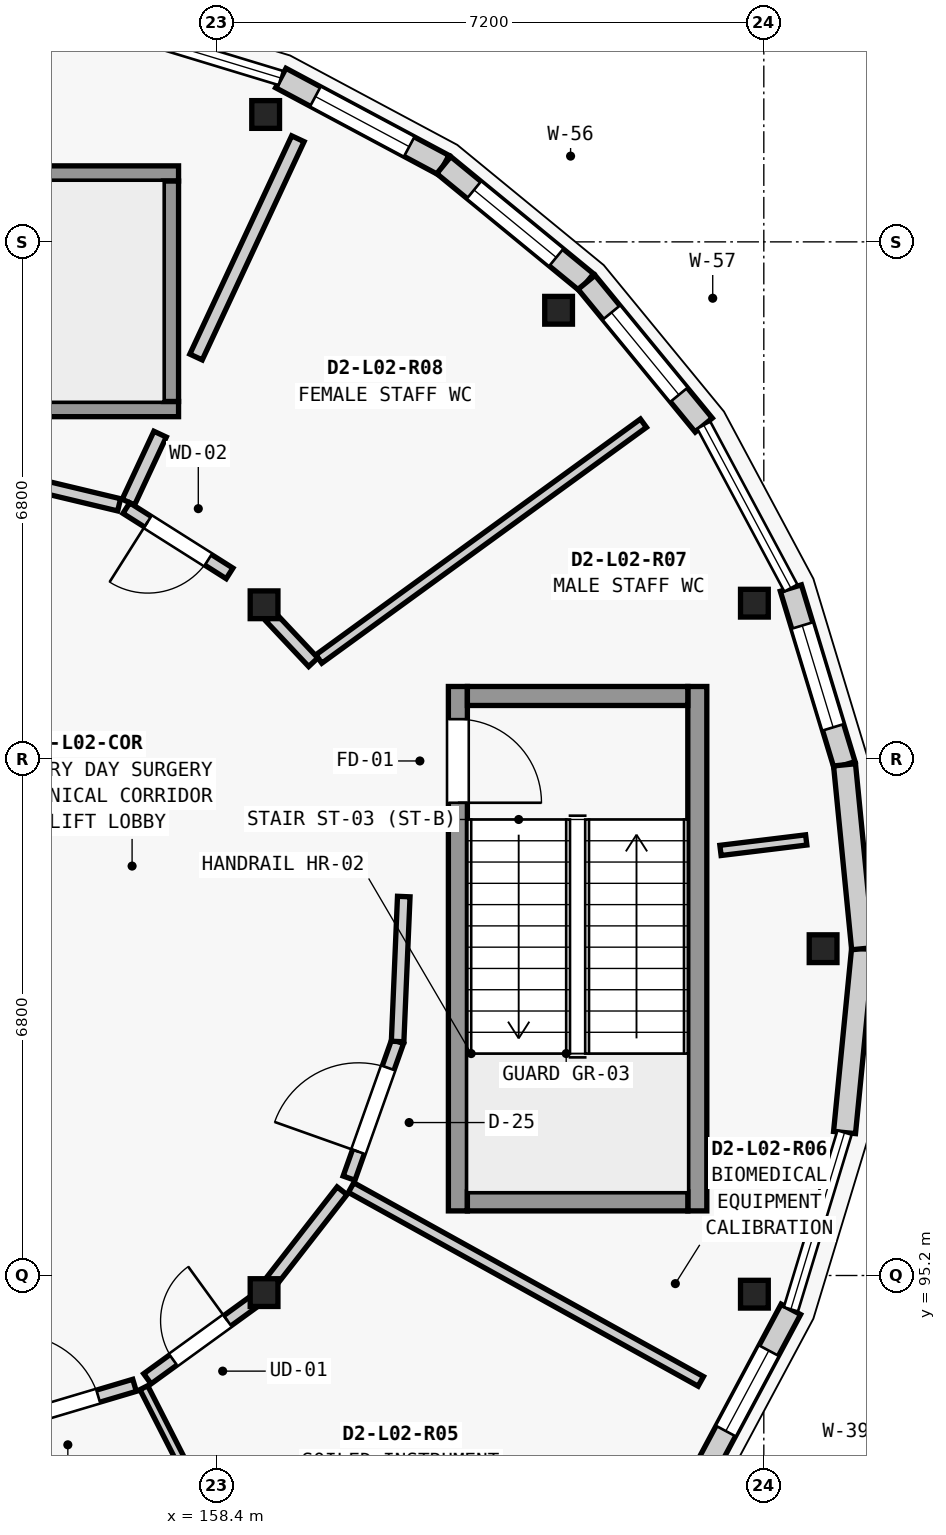
"""IFC4 building model, lengths in metres.
Left out: names, types, materials, properties, quantities, classifications, styles, units other than length and angle.
Written with IfcOpenShell. Run it as: python <this file> out.ifc"""

import sys

from ifc_helpers import new_model, si_unit, direction, frame, frame_2d, origin, origin_2d, place, context, subcontext, project, spatial, rectangle, extrude, element, fill, save


model = new_model("IFC4")
c1 = context("Model", 3, precision=1e-05, world=origin(), true_north=direction((0.0, 1.0)))
c2 = subcontext(c1, "Body", "Model", "MODEL_VIEW")
j1 = project(units=[si_unit("LENGTHUNIT", "METRE"), si_unit("PLANEANGLEUNIT", "RADIAN")], contexts=[c1])
p1 = place(None, origin())
s1 = spatial("IfcSite", under=j1, at=p1, CompositionType="ELEMENT")
p2 = place(p1, origin())
s2 = spatial("IfcBuilding", under=s1, at=p2, CompositionType="ELEMENT")
p3 = place(p2, frame((0.0, 0.0, 8.75)))
s3 = spatial("IfcBuildingStorey", under=s2, at=p3, CompositionType="ELEMENT", Elevation=8.75)
for number, where, z_axis, x_axis in (
    (1, (166.38, 99.5, 0.0), (0.0, 0.0, 1.0), (1.0, 0.0, 0.0)),
    (2, (165.476, 104.046, 0.0), (0.0, 0.0, 1.0), (1.0, 0.0, 0.0)),
    (3, (162.9, 107.9, 0.0), (0.0, 0.0, 1.0), (1.0, 0.0, 0.0)),
    (4, (159.046, 110.476, 0.0), (0.0, 0.0, 1.0), (1.0, 0.0, 0.0)),
    (5, (165.476, 94.954, 0.0), (0.0, 0.0, 1.0), (1.0, 0.0, 0.0)),
    (6, (159.025, 104.025, 0.0), (0.0, 0.0, 1.0), (1.0, 0.0, 0.0)),
    (7, (159.025, 94.975, 0.0), (0.0, 0.0, 1.0), (1.0, 0.0, 0.0)),
):
    element("IfcColumn", number, at=place(p3, frame(where, z_axis=z_axis, x_axis=x_axis)), inside=s3, PredefinedType="COLUMN", context=c2, shape_type="SweptSolid", body=[
        extrude(rectangle(XDim=0.365, YDim=0.365, at=origin_2d()), origin(), (0.0, 0.0, 1.0), 4.2),
    ])
p4 = place(p3, frame((166.9, 99.5, 0.0), z_axis=(0.0, 0.0, 1.0), x_axis=(-0.097832820839, -0.995202863323, 0.0)))
e8 = element("IfcWall", 8, at=p4, inside=s3, PredefinedType="ELEMENTEDWALL", context=c2, shape_type="SweptSolid", body=[
    extrude(rectangle(XDim=2.431, YDim=0.29, at=frame_2d((1.215, 0.0))), origin(), (0.0, 0.0, 1.0), 3.329),
])
p5 = place(p3, frame((165.956, 94.755, 0.0), z_axis=(0.0, 0.0, 1.0), x_axis=(-0.471432490996, -0.881902152415, 0.0)))
e9 = element("IfcWall", 9, at=p5, inside=s3, PredefinedType="ELEMENTEDWALL", context=c2, shape_type="SweptSolid", body=[
    extrude(rectangle(XDim=2.431, YDim=0.29, at=frame_2d((1.215, 0.0))), origin(), (0.0, 0.0, 1.0), 3.329),
])
p6 = place(p5, frame((0.616, 0.0, 0.85)))
e10 = element("IfcOpeningElement", 10, at=p6, cuts=e9, PredefinedType="OPENING", context=c2, shape_type="SweptSolid", body=[
    extrude(rectangle(XDim=1.2, YDim=2.25, at=frame_2d((0.6, 1.125))), frame((0.0, 0.155, 0.0), z_axis=(0.0, -1.0, 0.0), x_axis=(1.0, 0.0, 0.0)), (0.0, 0.0, 1.0), 0.31),
])
p7 = place(p3, frame((159.245, 110.956, 0.0), z_axis=(0.0, 0.0, 1.0), x_axis=(0.881902152415, -0.471432490996, 0.0)))
e11 = element("IfcWall", 11, at=p7, inside=s3, PredefinedType="ELEMENTEDWALL", context=c2, shape_type="SweptSolid", body=[
    extrude(rectangle(XDim=2.431, YDim=0.29, at=frame_2d((1.215, 0.0))), origin(), (0.0, 0.0, 1.0), 3.329),
])
p8 = place(p7, frame((0.516, 0.0, 0.85)))
e12 = element("IfcOpeningElement", 12, at=p8, cuts=e11, PredefinedType="OPENING", context=c2, shape_type="SweptSolid", body=[
    extrude(rectangle(XDim=1.4, YDim=1.25, at=frame_2d((0.7, 0.625))), frame((0.0, 0.155, 0.0), z_axis=(0.0, -1.0, 0.0), x_axis=(1.0, 0.0, 0.0)), (0.0, 0.0, 1.0), 0.31),
])
p9 = place(p3, frame((161.389, 109.81, 0.0), z_axis=(0.0, 0.0, 1.0), x_axis=(0.773048113134, -0.634347392822, 0.0)))
e13 = element("IfcWall", 13, at=p9, inside=s3, PredefinedType="ELEMENTEDWALL", context=c2, shape_type="SweptSolid", body=[
    extrude(rectangle(XDim=2.431, YDim=0.29, at=frame_2d((1.215, 0.0))), origin(), (0.0, 0.0, 1.0), 3.329),
])
p10 = place(p9, frame((0.515, 0.0, 0.85)))
e14 = element("IfcOpeningElement", 14, at=p10, cuts=e13, PredefinedType="OPENING", context=c2, shape_type="SweptSolid", body=[
    extrude(rectangle(XDim=1.4, YDim=1.6, at=frame_2d((0.7, 0.8))), frame((0.0, 0.155, 0.0), z_axis=(0.0, -1.0, 0.0), x_axis=(1.0, 0.0, 0.0)), (0.0, 0.0, 1.0), 0.31),
])
p11 = place(p3, frame((163.268, 108.268, 0.0), z_axis=(0.0, 0.0, 1.0), x_axis=(0.634347392822, -0.773048113134, 0.0)))
e15 = element("IfcWall", 15, at=p11, inside=s3, PredefinedType="ELEMENTEDWALL", context=c2, shape_type="SweptSolid", body=[
    extrude(rectangle(XDim=2.431, YDim=0.29, at=frame_2d((1.215, 0.0))), origin(), (0.0, 0.0, 1.0), 3.329),
])
p12 = place(p11, frame((0.515, 0.0, 0.85)))
e16 = element("IfcOpeningElement", 16, at=p12, cuts=e15, PredefinedType="OPENING", context=c2, shape_type="SweptSolid", body=[
    extrude(rectangle(XDim=1.4, YDim=1.9, at=frame_2d((0.7, 0.95))), frame((0.0, 0.155, 0.0), z_axis=(0.0, -1.0, 0.0), x_axis=(1.0, 0.0, 0.0)), (0.0, 0.0, 1.0), 0.31),
])
p13 = place(p3, frame((165.956, 104.245, 0.0), z_axis=(0.0, 0.0, 1.0), x_axis=(0.290442193951, -0.956892539407, 0.0)))
e17 = element("IfcWall", 17, at=p13, inside=s3, PredefinedType="ELEMENTEDWALL", context=c2, shape_type="SweptSolid", body=[
    extrude(rectangle(XDim=2.431, YDim=0.29, at=frame_2d((1.215, 0.0))), origin(), (0.0, 0.0, 1.0), 3.329),
])
p14 = place(p13, frame((0.515, 0.0, 0.85)))
e18 = element("IfcOpeningElement", 18, at=p14, cuts=e17, PredefinedType="OPENING", context=c2, shape_type="SweptSolid", body=[
    extrude(rectangle(XDim=1.4, YDim=2.2, at=frame_2d((0.7, 1.1))), frame((0.0, 0.155, 0.0), z_axis=(0.0, -1.0, 0.0), x_axis=(1.0, 0.0, 0.0)), (0.0, 0.0, 1.0), 0.31),
])
p15 = place(p3, frame((166.662, 101.919, 0.0), z_axis=(0.0, 0.0, 1.0), x_axis=(0.097832820839, -0.995202863323, 0.0)))
e19 = element("IfcWall", 19, at=p15, inside=s3, PredefinedType="ELEMENTEDWALL", context=c2, shape_type="SweptSolid", body=[
    extrude(rectangle(XDim=2.431, YDim=0.29, at=frame_2d((1.215, 0.0))), origin(), (0.0, 0.0, 1.0), 3.329),
])
p16 = place(p3, frame((161.575, 102.95, 0.0), z_axis=(0.0, 0.0, 1.0), x_axis=(0.0, -1.0, 0.0)))
e20 = element("IfcWall", 20, at=p16, inside=s3, PredefinedType="SHEAR", context=c2, shape_type="SweptSolid", body=[
    extrude(rectangle(XDim=6.9, YDim=0.25, at=frame_2d((3.45, 0.0))), origin(), (0.0, 0.0, 1.0), 3.975),
])
p17 = place(p16, frame((0.43, 0.0, 0.0)))
e21 = element("IfcOpeningElement", 21, at=p17, cuts=e20, PredefinedType="OPENING", context=c2, shape_type="SweptSolid", body=[
    extrude(rectangle(XDim=1.1, YDim=2.15, at=frame_2d((0.55, 1.075))), frame((0.0, 0.135, 0.0), z_axis=(0.0, -1.0, 0.0), x_axis=(1.0, 0.0, 0.0)), (0.0, 0.0, 1.0), 0.27),
])
p18 = place(p3, frame((164.725, 102.95, 0.0), z_axis=(0.0, 0.0, 1.0), x_axis=(0.0, -1.0, 0.0)))
e22 = element("IfcWall", 22, at=p18, inside=s3, PredefinedType="SHEAR", context=c2, shape_type="SweptSolid", body=[
    extrude(rectangle(XDim=6.9, YDim=0.25, at=frame_2d((3.45, 0.0))), origin(), (0.0, 0.0, 1.0), 3.975),
])
for number, where, z_axis, x_axis in (
    (23, (161.7, 102.825, 0.0), (0.0, 0.0, 1.0), (1.0, 0.0, 0.0)),
    (24, (161.7, 96.175, 0.0), (0.0, 0.0, 1.0), (1.0, 0.0, 0.0)),
):
    element("IfcWall", number, at=place(p3, frame(where, z_axis=z_axis, x_axis=x_axis)), inside=s3, PredefinedType="SHEAR", context=c2, shape_type="SweptSolid", body=[
        extrude(rectangle(XDim=2.9, YDim=0.25, at=frame_2d((1.45, 0.0))), origin(), (0.0, 0.0, 1.0), 3.975),
    ])
p19 = place(p3, frame((151.1, 106.6, 0.0), z_axis=(0.0, 0.0, 1.0), x_axis=(1.0, 0.0, 0.0)))
e25 = element("IfcWall", 25, at=p19, inside=s3, PredefinedType="SHEAR", context=c2, shape_type="SweptSolid", body=[
    extrude(rectangle(XDim=6.8, YDim=0.2, at=frame_2d((3.4, 0.0))), origin(), (0.0, 0.0, 1.0), 3.975),
])
p20 = place(p19, frame((0.38, 0.0, 0.0)))
e26 = element("IfcOpeningElement", 26, at=p20, cuts=e25, PredefinedType="OPENING", context=c2, shape_type="SweptSolid", body=[
    extrude(rectangle(XDim=1.05, YDim=2.15, at=frame_2d((0.525, 1.075))), frame((0.0, 0.11, 0.0), z_axis=(0.0, -1.0, 0.0), x_axis=(1.0, 0.0, 0.0)), (0.0, 0.0, 1.0), 0.22),
])
p21 = place(p3, frame((151.1, 109.7, 0.0), z_axis=(0.0, 0.0, 1.0), x_axis=(1.0, 0.0, 0.0)))
e27 = element("IfcWall", 27, at=p21, inside=s3, PredefinedType="SHEAR", context=c2, shape_type="SweptSolid", body=[
    extrude(rectangle(XDim=6.8, YDim=0.2, at=frame_2d((3.4, 0.0))), origin(), (0.0, 0.0, 1.0), 3.975),
])
p22 = place(p3, frame((157.8, 106.7, 0.0), z_axis=(0.0, 0.0, 1.0), x_axis=(0.0, 1.0, 0.0)))
e28 = element("IfcWall", 28, at=p22, inside=s3, PredefinedType="SHEAR", context=c2, shape_type="SweptSolid", body=[
    extrude(rectangle(XDim=2.9, YDim=0.2, at=frame_2d((1.45, 0.0))), origin(), (0.0, 0.0, 1.0), 3.975),
])
p23 = place(p3, frame((157.24, 105.376, 0.0), z_axis=(0.0, 0.0, 1.0), x_axis=(0.422695781641, 0.906271634877, 0.0)))
e29 = element("IfcWall", 29, at=p23, inside=s3, PredefinedType="PARTITIONING", context=c2, shape_type="SweptSolid", body=[
    extrude(rectangle(XDim=0.987, YDim=0.18, at=frame_2d((0.493, 0.0))), origin(), (0.0, 0.0, 1.0), 3.304),
])
p24 = place(p3, frame((158.13, 107.285, 0.0), z_axis=(0.0, 0.0, 1.0), x_axis=(0.422830642255, 0.906208722078, 0.0)))
e30 = element("IfcWall", 30, at=p24, inside=s3, PredefinedType="PARTITIONING", context=c2, shape_type="SweptSolid", body=[
    extrude(rectangle(XDim=3.169, YDim=0.18, at=frame_2d((1.585, 0.0))), origin(), (0.0, 0.0, 1.0), 3.304),
])
p25 = place(p3, frame((157.443, 93.724, 0.0), z_axis=(0.0, 0.0, 1.0), x_axis=(0.454011967175, -0.890995585658, 0.0)))
e31 = element("IfcWall", 31, at=p25, inside=s3, PredefinedType="PARTITIONING", context=c2, shape_type="SweptSolid", body=[
    extrude(rectangle(XDim=5.262, YDim=0.115, at=frame_2d((2.631, 0.0))), origin(), (0.0, 0.0, 1.0), 3.304),
])
p26 = place(p3, frame((160.17, 96.357, 0.0), z_axis=(0.0, 0.0, 1.0), x_axis=(0.874649389138, -0.484756068638, 0.0)))
e32 = element("IfcWall", 32, at=p26, inside=s3, PredefinedType="PARTITIONING", context=c2, shape_type="SweptSolid", body=[
    extrude(rectangle(XDim=5.26, YDim=0.145, at=frame_2d((2.63, 0.0))), origin(), (0.0, 0.0, 1.0), 3.304),
])
p27 = place(p3, frame((165.03, 100.793, 0.0), z_axis=(0.0, 0.0, 1.0), x_axis=(0.992604891092, 0.121389992092, 0.0)))
e33 = element("IfcWall", 33, at=p27, inside=s3, PredefinedType="PLUMBINGWALL", context=c2, shape_type="SweptSolid", body=[
    extrude(rectangle(XDim=1.136, YDim=0.135, at=frame_2d((0.568, 0.0))), origin(), (0.0, 0.0, 1.0), 3.304),
])
p28 = place(p3, frame((159.745, 103.311, 0.0), z_axis=(0.0, 0.0, 1.0), x_axis=(0.809019962828, 0.587781166545, 0.0)))
e34 = element("IfcWall", 34, at=p28, inside=s3, PredefinedType="PLUMBINGWALL", context=c2, shape_type="SweptSolid", body=[
    extrude(rectangle(XDim=5.279, YDim=0.135, at=frame_2d((2.64, 0.0))), origin(), (0.0, 0.0, 1.0), 3.304),
])
p29 = place(p3, frame((157.118, 105.34, 0.0), z_axis=(0.0, 0.0, 1.0), x_axis=(-0.972635355986, 0.232336962804, 0.0)))
e35 = element("IfcWall", 35, at=p29, inside=s3, PredefinedType="PARTITIONING", context=c2, shape_type="SweptSolid", body=[
    extrude(rectangle(XDim=2.38, YDim=0.165, at=frame_2d((1.19, 0.0))), origin(), (0.0, 0.0, 1.0), 3.304),
])
p30 = place(p3, frame((155.28, 93.148, 0.0), z_axis=(0.0, 0.0, 1.0), x_axis=(0.958517732376, 0.285032904628, 0.0)))
e36 = element("IfcWall", 36, at=p30, inside=s3, PredefinedType="PARTITIONING", context=c2, shape_type="SweptSolid", body=[
    extrude(rectangle(XDim=2.129, YDim=0.165, at=frame_2d((1.065, 0.0))), origin(), (0.0, 0.0, 1.0), 3.304),
])
p31 = place(p30, frame((0.5, 0.0, 0.0)))
e37 = element("IfcOpeningElement", 37, at=p31, cuts=e36, PredefinedType="OPENING", context=c2, shape_type="SweptSolid", body=[
    extrude(rectangle(XDim=1.13, YDim=2.14, at=frame_2d((0.565, 1.07))), frame((0.0, 0.093, 0.0), z_axis=(0.0, -1.0, 0.0), x_axis=(1.0, 0.0, 0.0)), (0.0, 0.0, 1.0), 0.185),
])
p32 = place(p3, frame((157.49, 93.841, 0.0), z_axis=(0.0, 0.0, 1.0), x_axis=(0.809526218979, 0.587083725533, 0.0)))
e38 = element("IfcWall", 38, at=p32, inside=s3, PredefinedType="PARTITIONING", context=c2, shape_type="SweptSolid", body=[
    extrude(rectangle(XDim=1.722, YDim=0.165, at=frame_2d((0.861, 0.0))), origin(), (0.0, 0.0, 1.0), 3.304),
])
p33 = place(p32, frame((0.421, 0.0, 0.0)))
e39 = element("IfcOpeningElement", 39, at=p33, cuts=e38, PredefinedType="OPENING", context=c2, shape_type="SweptSolid", body=[
    extrude(rectangle(XDim=0.88, YDim=2.1, at=frame_2d((0.44, 1.05))), frame((0.0, 0.093, 0.0), z_axis=(0.0, -1.0, 0.0), x_axis=(1.0, 0.0, 0.0)), (0.0, 0.0, 1.0), 0.185),
])
p34 = place(p3, frame((159.129, 95.131, 0.0), z_axis=(0.0, 0.0, 1.0), x_axis=(0.61450363649, 0.788913988176, 0.0)))
e40 = element("IfcWall", 40, at=p34, inside=s3, PredefinedType="PARTITIONING", context=c2, shape_type="SweptSolid", body=[
    extrude(rectangle(XDim=1.5, YDim=0.165, at=frame_2d((0.75, 0.0))), origin(), (0.0, 0.0, 1.0), 3.304),
])
p35 = place(p3, frame((160.143, 96.481, 0.0), z_axis=(0.0, 0.0, 1.0), x_axis=(0.334820358273, 0.942281978861, 0.0)))
e41 = element("IfcWall", 41, at=p35, inside=s3, PredefinedType="PARTITIONING", context=c2, shape_type="SweptSolid", body=[
    extrude(rectangle(XDim=1.908, YDim=0.165, at=frame_2d((0.954, 0.0))), origin(), (0.0, 0.0, 1.0), 3.304),
])
p36 = place(p35, frame((0.369, 0.0, 0.0)))
e42 = element("IfcOpeningElement", 42, at=p36, cuts=e41, PredefinedType="OPENING", context=c2, shape_type="SweptSolid", body=[
    extrude(rectangle(XDim=1.17, YDim=2.24, at=frame_2d((0.585, 1.12))), frame((0.0, 0.093, 0.0), z_axis=(0.0, -1.0, 0.0), x_axis=(1.0, 0.0, 0.0)), (0.0, 0.0, 1.0), 0.185),
])
p37 = place(p3, frame((160.782, 98.279, 0.0), z_axis=(0.0, 0.0, 1.0), x_axis=(0.042465818656, 0.999097920249, 0.0)))
e43 = element("IfcWall", 43, at=p37, inside=s3, PredefinedType="PARTITIONING", context=c2, shape_type="SweptSolid", body=[
    extrude(rectangle(XDim=1.909, YDim=0.165, at=frame_2d((0.954, 0.0))), origin(), (0.0, 0.0, 1.0), 3.304),
])
p38 = place(p3, frame((159.672, 103.269, 0.0), z_axis=(0.0, 0.0, 1.0), x_axis=(-0.685308492068, 0.728252889249, 0.0)))
e44 = element("IfcWall", 44, at=p38, inside=s3, PredefinedType="PARTITIONING", context=c2, shape_type="SweptSolid", body=[
    extrude(rectangle(XDim=0.813, YDim=0.165, at=frame_2d((0.406, 0.0))), origin(), (0.0, 0.0, 1.0), 3.304),
])
p39 = place(p3, frame((158.571, 104.438, 0.0), z_axis=(0.0, 0.0, 1.0), x_axis=(-0.84510965167, 0.53459300094, 0.0)))
e45 = element("IfcWall", 45, at=p39, inside=s3, PredefinedType="PARTITIONING", context=c2, shape_type="SweptSolid", body=[
    extrude(rectangle(XDim=1.607, YDim=0.165, at=frame_2d((0.804, 0.0))), origin(), (0.0, 0.0, 1.0), 3.304),
])
p40 = place(p39, frame((0.333, 0.0, 0.0)))
e46 = element("IfcOpeningElement", 46, at=p40, cuts=e45, PredefinedType="OPENING", context=c2, shape_type="SweptSolid", body=[
    extrude(rectangle(XDim=0.94, YDim=2.1, at=frame_2d((0.47, 1.05))), frame((0.0, 0.093, 0.0), z_axis=(0.0, -1.0, 0.0), x_axis=(1.0, 0.0, 0.0)), (0.0, 0.0, 1.0), 0.185),
])
p41 = place(p6, origin())
e47 = element("IfcWindow", 47, at=p41, inside=s3, PartitioningType="SINGLE_PANEL", PredefinedType="WINDOW", context=c2, shape_type="SweptSolid", body=[
    extrude(rectangle(XDim=1.2, YDim=2.25, at=frame_2d((0.6, 1.125))), frame((0.0, 0.03, 0.0), z_axis=(0.0, -1.0, 0.0), x_axis=(1.0, 0.0, 0.0)), (0.0, 0.0, 1.0), 0.06),
])
fill(e10, e47)
p42 = place(p8, origin())
e48 = element("IfcWindow", 48, at=p42, inside=s3, PartitioningType="SINGLE_PANEL", PredefinedType="WINDOW", context=c2, shape_type="SweptSolid", body=[
    extrude(rectangle(XDim=1.4, YDim=1.25, at=frame_2d((0.7, 0.625))), frame((0.0, 0.03, 0.0), z_axis=(0.0, -1.0, 0.0), x_axis=(1.0, 0.0, 0.0)), (0.0, 0.0, 1.0), 0.06),
])
fill(e12, e48)
p43 = place(p10, origin())
e49 = element("IfcWindow", 49, at=p43, inside=s3, PartitioningType="SINGLE_PANEL", PredefinedType="WINDOW", context=c2, shape_type="SweptSolid", body=[
    extrude(rectangle(XDim=1.4, YDim=1.6, at=frame_2d((0.7, 0.8))), frame((0.0, 0.03, 0.0), z_axis=(0.0, -1.0, 0.0), x_axis=(1.0, 0.0, 0.0)), (0.0, 0.0, 1.0), 0.06),
])
fill(e14, e49)
p44 = place(p12, origin())
e50 = element("IfcWindow", 50, at=p44, inside=s3, PartitioningType="SINGLE_PANEL", PredefinedType="WINDOW", context=c2, shape_type="SweptSolid", body=[
    extrude(rectangle(XDim=1.4, YDim=1.9, at=frame_2d((0.7, 0.95))), frame((0.0, 0.03, 0.0), z_axis=(0.0, -1.0, 0.0), x_axis=(1.0, 0.0, 0.0)), (0.0, 0.0, 1.0), 0.06),
])
fill(e16, e50)
p45 = place(p14, origin())
e51 = element("IfcWindow", 51, at=p45, inside=s3, PartitioningType="SINGLE_PANEL", PredefinedType="WINDOW", context=c2, shape_type="SweptSolid", body=[
    extrude(rectangle(XDim=1.4, YDim=2.2, at=frame_2d((0.7, 1.1))), frame((0.0, 0.03, 0.0), z_axis=(0.0, -1.0, 0.0), x_axis=(1.0, 0.0, 0.0)), (0.0, 0.0, 1.0), 0.06),
])
fill(e18, e51)
p46 = place(p17, origin())
e52 = element("IfcDoor", 52, at=p46, inside=s3, OperationType="SINGLE_SWING_RIGHT", PredefinedType="DOOR", context=c2, shape_type="SweptSolid", body=[
    extrude(rectangle(XDim=1.1, YDim=2.15, at=frame_2d((0.55, 1.075))), frame((0.0, 0.025, 0.0), z_axis=(0.0, -1.0, 0.0), x_axis=(1.0, 0.0, 0.0)), (0.0, 0.0, 1.0), 0.05),
])
fill(e21, e52)
p47 = place(p31, origin())
e53 = element("IfcDoor", 53, at=p47, inside=s3, OperationType="SINGLE_SWING_LEFT", PredefinedType="DOOR", context=c2, shape_type="SweptSolid", body=[
    extrude(rectangle(XDim=1.13, YDim=2.14, at=frame_2d((0.565, 1.07))), frame((0.0, 0.025, 0.0), z_axis=(0.0, -1.0, 0.0), x_axis=(1.0, 0.0, 0.0)), (0.0, 0.0, 1.0), 0.05),
])
fill(e37, e53)
p48 = place(p33, origin())
e54 = element("IfcDoor", 54, at=p48, inside=s3, OperationType="SINGLE_SWING_RIGHT", PredefinedType="DOOR", context=c2, shape_type="SweptSolid", body=[
    extrude(rectangle(XDim=0.88, YDim=2.1, at=frame_2d((0.44, 1.05))), frame((0.0, 0.025, 0.0), z_axis=(0.0, -1.0, 0.0), x_axis=(1.0, 0.0, 0.0)), (0.0, 0.0, 1.0), 0.05),
])
fill(e39, e54)
p49 = place(p36, origin())
e55 = element("IfcDoor", 55, at=p49, inside=s3, OperationType="SINGLE_SWING_LEFT", PredefinedType="DOOR", context=c2, shape_type="SweptSolid", body=[
    extrude(rectangle(XDim=1.17, YDim=2.24, at=frame_2d((0.585, 1.12))), frame((0.0, 0.025, 0.0), z_axis=(0.0, -1.0, 0.0), x_axis=(1.0, 0.0, 0.0)), (0.0, 0.0, 1.0), 0.05),
])
fill(e42, e55)
p50 = place(p40, origin())
e56 = element("IfcDoor", 56, at=p50, inside=s3, OperationType="SINGLE_SWING_RIGHT", PredefinedType="DOOR", context=c2, shape_type="SweptSolid", body=[
    extrude(rectangle(XDim=0.94, YDim=2.1, at=frame_2d((0.47, 1.05))), frame((0.0, 0.025, 0.0), z_axis=(0.0, -1.0, 0.0), x_axis=(1.0, 0.0, 0.0)), (0.0, 0.0, 1.0), 0.05),
])
fill(e46, e56)
save(model, sys.argv[1])
